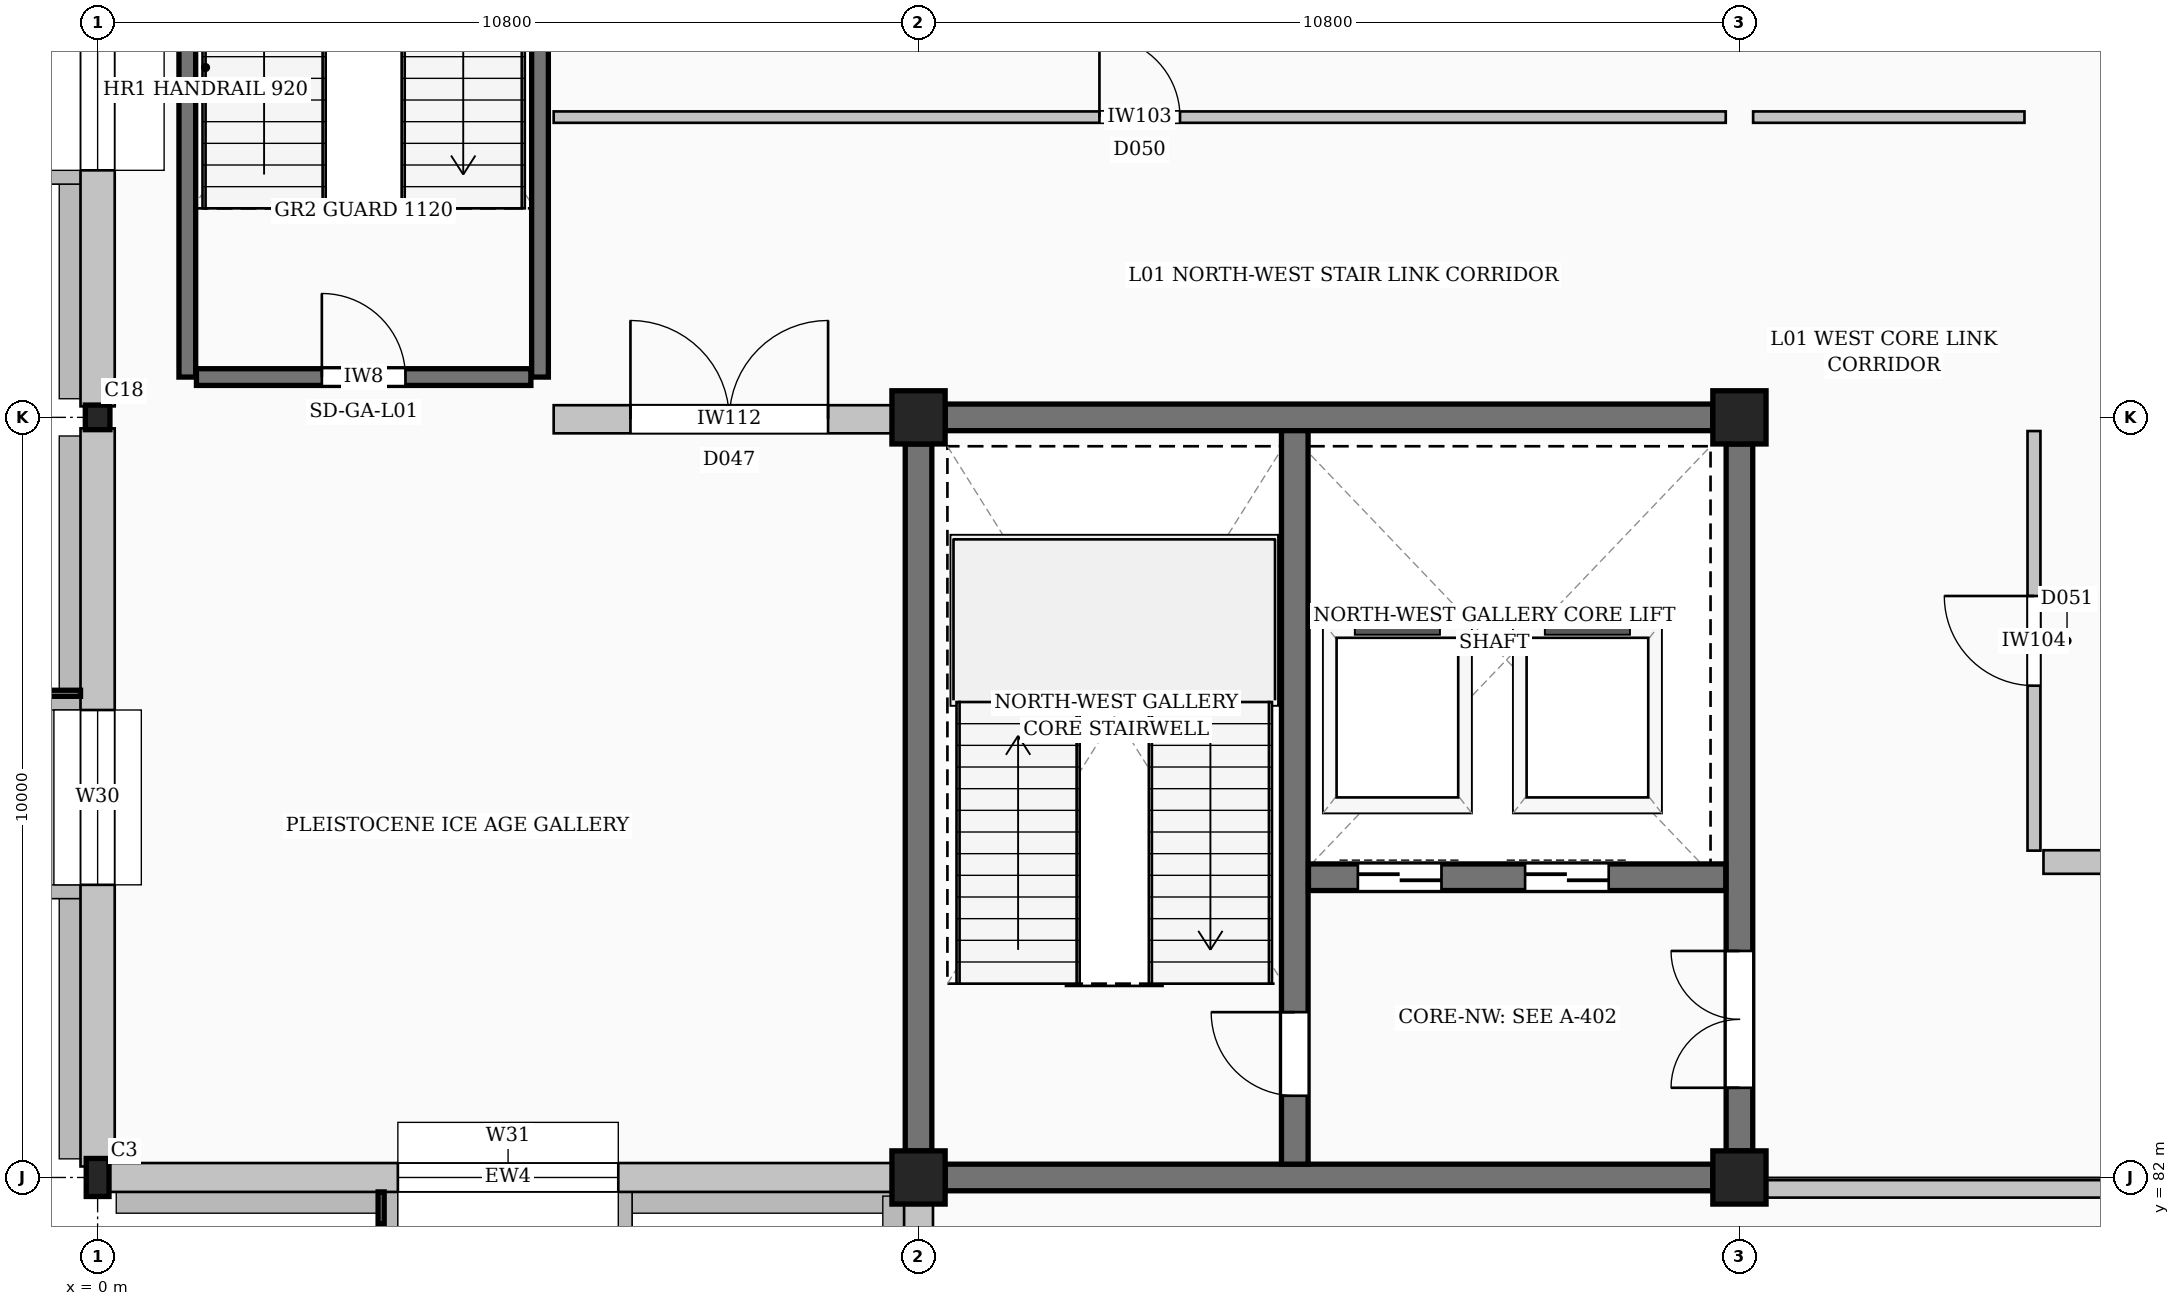
"""IFC4 building model, lengths in metres.
Left out: names, types, materials, properties, quantities, classifications, styles, units other than length and angle.
Written with IfcOpenShell. Run it as: python <this file> out.ifc"""

import sys

from ifc_helpers import new_model, si_unit, direction, frame, frame_2d, origin, origin_2d, place, context, subcontext, project, spatial, rectangle, hollow_circle, i_section, extrude, element, fill, save


model = new_model("IFC4")
c1 = context("Model", 3, precision=1e-05, world=origin(), true_north=direction((0.0, 1.0)))
c2 = subcontext(c1, "Body", "Model", "MODEL_VIEW")
j1 = project(units=[si_unit("LENGTHUNIT", "METRE"), si_unit("PLANEANGLEUNIT", "RADIAN")], contexts=[c1])
p1 = place(None, origin())
s1 = spatial("IfcSite", under=j1, at=p1, CompositionType="ELEMENT")
p2 = place(p1, origin())
s2 = spatial("IfcBuilding", under=s1, at=p2, CompositionType="ELEMENT")
p3 = place(p2, frame((0.0, 0.0, 4.8)))
s3 = spatial("IfcBuildingStorey", under=s2, at=p3, CompositionType="ELEMENT", Elevation=4.8)
p4 = place(p3, frame((0.0, 82.0, 0.0), z_axis=(0.0, 0.0, 1.0), x_axis=(1.0, 0.0, 0.0)))
e1 = element("IfcColumn", 1, at=p4, inside=s3, PredefinedType="COLUMN", context=c2, shape_type="SweptSolid", body=[
    extrude(i_section(OverallWidth=0.3, OverallDepth=0.5, WebThickness=0.014, FlangeThickness=0.028, FilletRadius=0.027, at=origin_2d()), origin(), (0.0, 0.0, 1.0), 4.8),
])
p5 = place(p3, frame((0.0, 92.0, 0.0), z_axis=(0.0, 0.0, 1.0), x_axis=(1.0, 0.0, 0.0)))
e2 = element("IfcColumn", 2, at=p5, inside=s3, PredefinedType="COLUMN", context=c2, shape_type="SweptSolid", body=[
    extrude(hollow_circle(Radius=0.162, WallThickness=0.014, at=origin_2d()), origin(), (0.0, 0.0, 1.0), 4.8),
])
for number, where, z_axis, x_axis in (
    (3, (10.8, 82.0, 0.0), (0.0, 0.0, 1.0), (1.0, 0.0, 0.0)),
    (4, (10.8, 92.0, 0.0), (0.0, 0.0, 1.0), (1.0, 0.0, 0.0)),
    (5, (21.6, 82.0, 0.0), (0.0, 0.0, 1.0), (1.0, 0.0, 0.0)),
    (6, (21.6, 92.0, 0.0), (0.0, 0.0, 1.0), (1.0, 0.0, 0.0)),
):
    element("IfcColumn", number, at=place(p3, frame(where, z_axis=z_axis, x_axis=x_axis)), inside=s3, PredefinedType="COLUMN", context=c2, shape_type="SweptSolid", body=[
        extrude(rectangle(XDim=0.7, YDim=0.7, at=origin_2d()), origin(), (0.0, 0.0, 1.0), 4.8),
    ])
p6 = place(p3, frame((0.0, 101.855, 0.0), z_axis=(0.0, 0.0, 1.0), x_axis=(0.0, -1.0, 0.0)))
e7 = element("IfcWall", 7, at=p6, inside=s3, PredefinedType="STANDARD", context=c2, shape_type="SweptSolid", body=[
    extrude(rectangle(XDim=9.71, YDim=0.45, at=frame_2d((4.855, 0.0))), origin(), (0.0, 0.0, 1.0), 4.56),
])
p7 = place(p6, frame((3.105, 0.0, 1.0)))
e8 = element("IfcOpeningElement", 8, at=p7, cuts=e7, PredefinedType="OPENING", context=c2, shape_type="SweptSolid", body=[
    extrude(rectangle(XDim=3.5, YDim=2.3, at=frame_2d((1.75, 1.15))), frame((0.0, 0.235, 0.0), z_axis=(0.0, -1.0, 0.0), x_axis=(1.0, 0.0, 0.0)), (0.0, 0.0, 1.0), 0.47),
])
p8 = place(p3, frame((0.0, 91.855, 0.0), z_axis=(0.0, 0.0, 1.0), x_axis=(0.0, -1.0, 0.0)))
e9 = element("IfcWall", 9, at=p8, inside=s3, PredefinedType="STANDARD", context=c2, shape_type="SweptSolid", body=[
    extrude(rectangle(XDim=9.71, YDim=0.45, at=frame_2d((4.855, 0.0))), origin(), (0.0, 0.0, 1.0), 4.56),
])
p9 = place(p8, frame((3.705, 0.0, 1.0)))
e10 = element("IfcOpeningElement", 10, at=p9, cuts=e9, PredefinedType="OPENING", context=c2, shape_type="SweptSolid", body=[
    extrude(rectangle(XDim=2.3, YDim=2.3, at=frame_2d((1.15, 1.15))), frame((0.0, 0.235, 0.0), z_axis=(0.0, -1.0, 0.0), x_axis=(1.0, 0.0, 0.0)), (0.0, 0.0, 1.0), 0.47),
])
p10 = place(p3, frame((0.145, 82.0, 0.0), z_axis=(0.0, 0.0, 1.0), x_axis=(1.0, 0.0, 0.0)))
e11 = element("IfcWall", 11, at=p10, inside=s3, PredefinedType="STANDARD", context=c2, shape_type="SweptSolid", body=[
    extrude(rectangle(XDim=10.51, YDim=0.38, at=frame_2d((5.255, 0.0))), origin(), (0.0, 0.0, 1.0), 3.939),
])
p11 = place(p10, frame((3.805, 0.0, 1.0)))
e12 = element("IfcOpeningElement", 12, at=p11, cuts=e11, PredefinedType="OPENING", context=c2, shape_type="SweptSolid", body=[
    extrude(rectangle(XDim=2.9, YDim=2.5, at=frame_2d((1.45, 1.25))), frame((0.0, 0.2, 0.0), z_axis=(0.0, -1.0, 0.0), x_axis=(1.0, 0.0, 0.0)), (0.0, 0.0, 1.0), 0.4),
])
p12 = place(p3, frame((10.8, 81.855, 0.0), z_axis=(0.0, 0.0, 1.0), x_axis=(0.0, -1.0, 0.0)))
e13 = element("IfcWall", 13, at=p12, inside=s3, PredefinedType="STANDARD", context=c2, shape_type="SweptSolid", body=[
    extrude(rectangle(XDim=9.71, YDim=0.38, at=frame_2d((4.855, 0.0))), origin(), (0.0, 0.0, 1.0), 4.04),
])
p13 = place(p12, frame((3.105, 0.0, 1.0)))
e14 = element("IfcOpeningElement", 14, at=p13, cuts=e13, PredefinedType="OPENING", context=c2, shape_type="SweptSolid", body=[
    extrude(rectangle(XDim=3.5, YDim=2.3, at=frame_2d((1.75, 1.15))), frame((0.0, 0.2, 0.0), z_axis=(0.0, -1.0, 0.0), x_axis=(1.0, 0.0, 0.0)), (0.0, 0.0, 1.0), 0.4),
])
for number, where, z_axis, x_axis in (
    (15, (11.15, 82.0, 0.0), (0.0, 0.0, 1.0), (1.0, 0.0, 0.0)),
    (16, (11.15, 92.0, 0.0), (0.0, 0.0, 1.0), (1.0, 0.0, 0.0)),
):
    element("IfcWall", number, at=place(p3, frame(where, z_axis=z_axis, x_axis=x_axis)), inside=s3, PredefinedType="SHEAR", context=c2, shape_type="SweptSolid", body=[
        extrude(rectangle(XDim=10.1, YDim=0.35, at=frame_2d((5.05, 0.0))), origin(), (0.0, 0.0, 1.0), 4.56),
    ])
p14 = place(p3, frame((10.8, 82.35, 0.0), z_axis=(0.0, 0.0, 1.0), x_axis=(0.0, 1.0, 0.0)))
e17 = element("IfcWall", 17, at=p14, inside=s3, PredefinedType="SHEAR", context=c2, shape_type="SweptSolid", body=[
    extrude(rectangle(XDim=9.3, YDim=0.35, at=frame_2d((4.65, 0.0))), origin(), (0.0, 0.0, 1.0), 4.56),
])
p15 = place(p3, frame((21.6, 82.35, 0.0), z_axis=(0.0, 0.0, 1.0), x_axis=(0.0, 1.0, 0.0)))
e18 = element("IfcWall", 18, at=p15, inside=s3, PredefinedType="SHEAR", context=c2, shape_type="SweptSolid", body=[
    extrude(rectangle(XDim=9.3, YDim=0.35, at=frame_2d((4.65, 0.0))), origin(), (0.0, 0.0, 1.0), 4.56),
])
p16 = place(p15, frame((0.83, 0.0, 0.0)))
e19 = element("IfcOpeningElement", 19, at=p16, cuts=e18, PredefinedType="OPENING", context=c2, shape_type="SweptSolid", body=[
    extrude(rectangle(XDim=1.8, YDim=2.25, at=frame_2d((0.9, 1.125))), frame((0.0, 0.185, 0.0), z_axis=(0.0, -1.0, 0.0), x_axis=(1.0, 0.0, 0.0)), (0.0, 0.0, 1.0), 0.37),
])
p17 = place(p3, frame((15.75, 82.175, 0.0), z_axis=(0.0, 0.0, 1.0), x_axis=(0.0, 1.0, 0.0)))
e20 = element("IfcWall", 20, at=p17, inside=s3, PredefinedType="SHEAR", context=c2, shape_type="SweptSolid", body=[
    extrude(rectangle(XDim=9.65, YDim=0.35, at=frame_2d((4.825, 0.0))), origin(), (0.0, 0.0, 1.0), 4.56),
])
p18 = place(p17, frame((0.9, 0.0, 0.0)))
e21 = element("IfcOpeningElement", 21, at=p18, cuts=e20, PredefinedType="OPENING", context=c2, shape_type="SweptSolid", body=[
    extrude(rectangle(XDim=1.1, YDim=2.2, at=frame_2d((0.55, 1.1))), frame((0.0, 0.185, 0.0), z_axis=(0.0, -1.0, 0.0), x_axis=(1.0, 0.0, 0.0)), (0.0, 0.0, 1.0), 0.37),
])
p19 = place(p3, frame((15.93, 85.95, 0.0), z_axis=(0.0, 0.0, 1.0), x_axis=(1.0, 0.0, 0.0)))
e22 = element("IfcWall", 22, at=p19, inside=s3, PredefinedType="SHEAR", context=c2, shape_type="SweptSolid", body=[
    extrude(rectangle(XDim=5.49, YDim=0.35, at=frame_2d((2.745, 0.0))), origin(), (0.0, 0.0, 1.0), 4.56),
])
p20 = place(p19, frame((0.65, 0.0, 0.0)))
e23 = element("IfcOpeningElement", 23, at=p20, cuts=e22, PredefinedType="OPENING", context=c2, shape_type="SweptSolid", body=[
    extrude(rectangle(XDim=1.1, YDim=2.2, at=frame_2d((0.55, 1.1))), frame((0.0, 0.185, 0.0), z_axis=(0.0, -1.0, 0.0), x_axis=(1.0, 0.0, 0.0)), (0.0, 0.0, 1.0), 0.37),
])
p21 = place(p19, frame((2.85, 0.0, 0.0)))
e24 = element("IfcOpeningElement", 24, at=p21, cuts=e22, PredefinedType="OPENING", context=c2, shape_type="SweptSolid", body=[
    extrude(rectangle(XDim=1.1, YDim=2.2, at=frame_2d((0.55, 1.1))), frame((0.0, 0.185, 0.0), z_axis=(0.0, -1.0, 0.0), x_axis=(1.0, 0.0, 0.0)), (0.0, 0.0, 1.0), 0.37),
])
for number, where, z_axis, x_axis in (
    (25, (1.18, 92.53, 0.0), (0.0, 0.0, 1.0), (0.0, 1.0, 0.0)),
    (26, (5.82, 92.53, 0.0), (0.0, 0.0, 1.0), (0.0, 1.0, 0.0)),
):
    element("IfcWall", number, at=place(p3, frame(where, z_axis=z_axis, x_axis=x_axis)), inside=s3, PredefinedType="SHEAR", context=c2, shape_type="SweptSolid", body=[
        extrude(rectangle(XDim=9.14, YDim=0.22, at=frame_2d((4.57, 0.0))), origin(), (0.0, 0.0, 1.0), 4.56),
    ])
p22 = place(p3, frame((1.3, 92.53, 0.0), z_axis=(0.0, 0.0, 1.0), x_axis=(1.0, 0.0, 0.0)))
e27 = element("IfcWall", 27, at=p22, inside=s3, PredefinedType="SHEAR", context=c2, shape_type="SweptSolid", body=[
    extrude(rectangle(XDim=4.4, YDim=0.22, at=frame_2d((2.2, 0.0))), origin(), (0.0, 0.0, 1.0), 4.56),
])
p23 = place(p22, frame((1.65, 0.0, 0.0)))
e28 = element("IfcOpeningElement", 28, at=p23, cuts=e27, PredefinedType="OPENING", context=c2, shape_type="SweptSolid", body=[
    extrude(rectangle(XDim=1.1, YDim=2.2, at=frame_2d((0.55, 1.1))), frame((0.0, 0.12, 0.0), z_axis=(0.0, -1.0, 0.0), x_axis=(1.0, 0.0, 0.0)), (0.0, 0.0, 1.0), 0.24),
])
p24 = place(p3, frame((21.78, 81.85, 0.0), z_axis=(0.0, 0.0, 1.0), x_axis=(1.0, 0.0, 0.0)))
e29 = element("IfcWall", 29, at=p24, inside=s3, PredefinedType="PARTITIONING", context=c2, shape_type="SweptSolid", body=[
    extrude(rectangle(XDim=10.42, YDim=0.23, at=frame_2d((5.21, 0.0))), origin(), (0.0, 0.0, 1.0), 3.939),
])
p25 = place(p3, frame((25.6, 86.15, 0.0), z_axis=(0.0, 0.0, 1.0), x_axis=(1.0, 0.0, 0.0)))
e30 = element("IfcWall", 30, at=p25, inside=s3, PredefinedType="PARTITIONING", context=c2, shape_type="SweptSolid", body=[
    extrude(rectangle(XDim=28.22, YDim=0.31, at=frame_2d((14.11, 0.0))), origin(), (0.0, 0.0, 1.0), 4.52),
])
p26 = place(p25, frame((12.96, 0.0, 0.0)))
e31 = element("IfcOpeningElement", 31, at=p26, cuts=e30, PredefinedType="OPENING", context=c2, shape_type="SweptSolid", body=[
    extrude(rectangle(XDim=2.3, YDim=2.65, at=frame_2d((1.15, 1.325))), frame((0.0, 0.165, 0.0), z_axis=(0.0, -1.0, 0.0), x_axis=(1.0, 0.0, 0.0)), (0.0, 0.0, 1.0), 0.33),
])
p27 = place(p3, frame((6.0, 91.975, 0.0), z_axis=(0.0, 0.0, 1.0), x_axis=(1.0, 0.0, 0.0)))
e32 = element("IfcWall", 32, at=p27, inside=s3, PredefinedType="PARTITIONING", context=c2, shape_type="SweptSolid", body=[
    extrude(rectangle(XDim=4.62, YDim=0.37, at=frame_2d((2.31, 0.0))), origin(), (0.0, 0.0, 1.0), 4.069),
])
p28 = place(p27, frame((1.01, 0.0, 0.0)))
e33 = element("IfcOpeningElement", 33, at=p28, cuts=e32, PredefinedType="OPENING", context=c2, shape_type="SweptSolid", body=[
    extrude(rectangle(XDim=2.6, YDim=2.8, at=frame_2d((1.3, 1.4))), frame((0.0, 0.195, 0.0), z_axis=(0.0, -1.0, 0.0), x_axis=(1.0, 0.0, 0.0)), (0.0, 0.0, 1.0), 0.39),
])
p29 = place(p3, frame((6.0, 95.95, 0.0), z_axis=(0.0, 0.0, 1.0), x_axis=(1.0, 0.0, 0.0)))
e34 = element("IfcWall", 34, at=p29, inside=s3, PredefinedType="PARTITIONING", context=c2, shape_type="SweptSolid", body=[
    extrude(rectangle(XDim=15.42, YDim=0.15, at=frame_2d((7.71, 0.0))), origin(), (0.0, 0.0, 1.0), 4.52),
])
p30 = place(p29, frame((7.18, 0.0, 0.0)))
e35 = element("IfcOpeningElement", 35, at=p30, cuts=e34, PredefinedType="OPENING", context=c2, shape_type="SweptSolid", body=[
    extrude(rectangle(XDim=1.06, YDim=2.22, at=frame_2d((0.53, 1.11))), frame((0.0, 0.085, 0.0), z_axis=(0.0, -1.0, 0.0), x_axis=(1.0, 0.0, 0.0)), (0.0, 0.0, 1.0), 0.17),
])
p31 = place(p3, frame((25.475, 86.3, 0.0), z_axis=(0.0, 0.0, 1.0), x_axis=(0.0, 1.0, 0.0)))
e36 = element("IfcWall", 36, at=p31, inside=s3, PredefinedType="PARTITIONING", context=c2, shape_type="SweptSolid", body=[
    extrude(rectangle(XDim=5.52, YDim=0.17, at=frame_2d((2.76, 0.0))), origin(), (0.0, 0.0, 1.0), 4.52),
])
p32 = place(p31, frame((2.17, 0.0, 0.0)))
e37 = element("IfcOpeningElement", 37, at=p32, cuts=e36, PredefinedType="OPENING", context=c2, shape_type="SweptSolid", body=[
    extrude(rectangle(XDim=1.18, YDim=2.28, at=frame_2d((0.59, 1.14))), frame((0.0, 0.095, 0.0), z_axis=(0.0, -1.0, 0.0), x_axis=(1.0, 0.0, 0.0)), (0.0, 0.0, 1.0), 0.19),
])
p33 = place(p3, frame((21.78, 95.95, 0.0), z_axis=(0.0, 0.0, 1.0), x_axis=(1.0, 0.0, 0.0)))
e38 = element("IfcWall", 38, at=p33, inside=s3, PredefinedType="PARTITIONING", context=c2, shape_type="SweptSolid", body=[
    extrude(rectangle(XDim=3.57, YDim=0.15, at=frame_2d((1.785, 0.0))), origin(), (0.0, 0.0, 1.0), 4.52),
])
p34 = place(p7, origin())
e39 = element("IfcWindow", 39, at=p34, inside=s3, PartitioningType="SINGLE_PANEL", PredefinedType="WINDOW", context=c2, shape_type="SweptSolid", body=[
    extrude(rectangle(XDim=3.5, YDim=2.3, at=frame_2d((1.75, 1.15))), frame((0.0, 0.03, 0.0), z_axis=(0.0, -1.0, 0.0), x_axis=(1.0, 0.0, 0.0)), (0.0, 0.0, 1.0), 0.06),
])
fill(e8, e39)
p35 = place(p9, origin())
e40 = element("IfcWindow", 40, at=p35, inside=s3, PartitioningType="SINGLE_PANEL", PredefinedType="WINDOW", context=c2, shape_type="SweptSolid", body=[
    extrude(rectangle(XDim=2.3, YDim=2.3, at=frame_2d((1.15, 1.15))), frame((0.0, 0.03, 0.0), z_axis=(0.0, -1.0, 0.0), x_axis=(1.0, 0.0, 0.0)), (0.0, 0.0, 1.0), 0.06),
])
fill(e10, e40)
p36 = place(p11, origin())
e41 = element("IfcWindow", 41, at=p36, inside=s3, PartitioningType="SINGLE_PANEL", PredefinedType="WINDOW", context=c2, shape_type="SweptSolid", body=[
    extrude(rectangle(XDim=2.9, YDim=2.5, at=frame_2d((1.45, 1.25))), frame((0.0, 0.03, 0.0), z_axis=(0.0, -1.0, 0.0), x_axis=(1.0, 0.0, 0.0)), (0.0, 0.0, 1.0), 0.06),
])
fill(e12, e41)
p37 = place(p18, origin())
e42 = element("IfcDoor", 42, at=p37, inside=s3, OperationType="SINGLE_SWING_RIGHT", PredefinedType="DOOR", context=c2, shape_type="SweptSolid", body=[
    extrude(rectangle(XDim=1.1, YDim=2.2, at=frame_2d((0.55, 1.1))), frame((0.0, 0.025, 0.0), z_axis=(0.0, -1.0, 0.0), x_axis=(1.0, 0.0, 0.0)), (0.0, 0.0, 1.0), 0.05),
])
fill(e21, e42)
p38 = place(p16, origin())
e43 = element("IfcDoor", 43, at=p38, inside=s3, OperationType="DOUBLE_DOOR_SINGLE_SWING", PredefinedType="DOOR", context=c2, shape_type="SweptSolid", body=[
    extrude(rectangle(XDim=1.8, YDim=2.25, at=frame_2d((0.9, 1.125))), frame((0.0, 0.025, 0.0), z_axis=(0.0, -1.0, 0.0), x_axis=(1.0, 0.0, 0.0)), (0.0, 0.0, 1.0), 0.05),
])
fill(e19, e43)
p39 = place(p20, origin())
e44 = element("IfcDoor", 44, at=p39, inside=s3, OperationType="DOUBLE_DOOR_SLIDING", PredefinedType="DOOR", context=c2, shape_type="SweptSolid", body=[
    extrude(rectangle(XDim=1.1, YDim=2.2, at=frame_2d((0.55, 1.1))), frame((0.0, 0.025, 0.0), z_axis=(0.0, -1.0, 0.0), x_axis=(1.0, 0.0, 0.0)), (0.0, 0.0, 1.0), 0.05),
])
fill(e23, e44)
p40 = place(p21, origin())
e45 = element("IfcDoor", 45, at=p40, inside=s3, OperationType="DOUBLE_DOOR_SLIDING", PredefinedType="DOOR", context=c2, shape_type="SweptSolid", body=[
    extrude(rectangle(XDim=1.1, YDim=2.2, at=frame_2d((0.55, 1.1))), frame((0.0, 0.025, 0.0), z_axis=(0.0, -1.0, 0.0), x_axis=(1.0, 0.0, 0.0)), (0.0, 0.0, 1.0), 0.05),
])
fill(e24, e45)
p41 = place(p23, origin())
e46 = element("IfcDoor", 46, at=p41, inside=s3, OperationType="SINGLE_SWING_LEFT", PredefinedType="DOOR", context=c2, shape_type="SweptSolid", body=[
    extrude(rectangle(XDim=1.1, YDim=2.2, at=frame_2d((0.55, 1.1))), frame((0.0, 0.025, 0.0), z_axis=(0.0, -1.0, 0.0), x_axis=(1.0, 0.0, 0.0)), (0.0, 0.0, 1.0), 0.05),
])
fill(e28, e46)
p42 = place(p28, origin())
e47 = element("IfcDoor", 47, at=p42, inside=s3, OperationType="DOUBLE_DOOR_SINGLE_SWING", PredefinedType="DOOR", context=c2, shape_type="SweptSolid", body=[
    extrude(rectangle(XDim=2.6, YDim=2.8, at=frame_2d((1.3, 1.4))), frame((0.0, 0.025, 0.0), z_axis=(0.0, -1.0, 0.0), x_axis=(1.0, 0.0, 0.0)), (0.0, 0.0, 1.0), 0.05),
])
fill(e33, e47)
p43 = place(p30, origin())
e48 = element("IfcDoor", 48, at=p43, inside=s3, OperationType="SINGLE_SWING_LEFT", PredefinedType="DOOR", context=c2, shape_type="SweptSolid", body=[
    extrude(rectangle(XDim=1.06, YDim=2.22, at=frame_2d((0.53, 1.11))), frame((0.0, 0.025, 0.0), z_axis=(0.0, -1.0, 0.0), x_axis=(1.0, 0.0, 0.0)), (0.0, 0.0, 1.0), 0.05),
])
fill(e35, e48)
p44 = place(p32, origin())
e49 = element("IfcDoor", 49, at=p44, inside=s3, OperationType="SINGLE_SWING_RIGHT", PredefinedType="DOOR", context=c2, shape_type="SweptSolid", body=[
    extrude(rectangle(XDim=1.18, YDim=2.28, at=frame_2d((0.59, 1.14))), frame((0.0, 0.025, 0.0), z_axis=(0.0, -1.0, 0.0), x_axis=(1.0, 0.0, 0.0)), (0.0, 0.0, 1.0), 0.05),
])
fill(e37, e49)
save(model, sys.argv[1])
